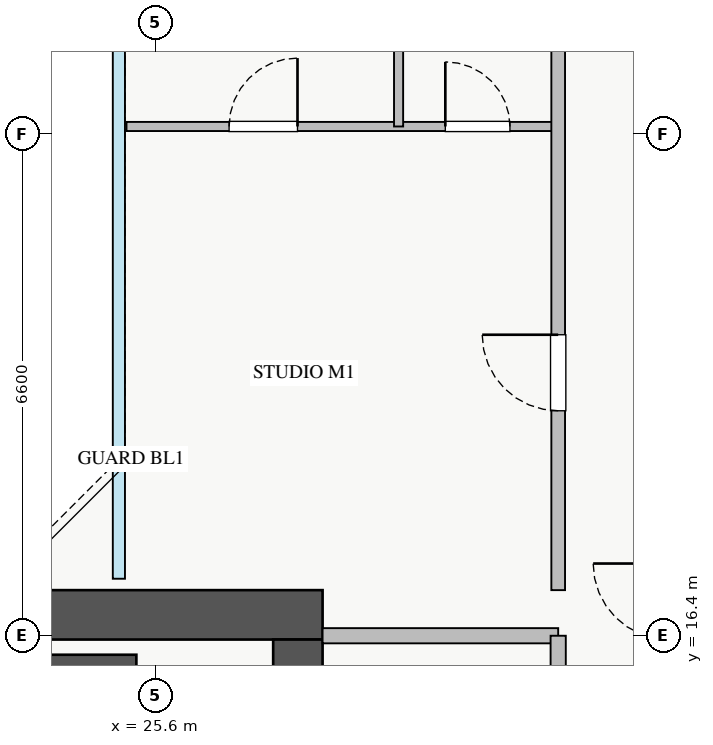
"""IFC4 building model, lengths in metres.
Left out: names, types, materials, properties, quantities, classifications, styles, units other than length and angle.
Written with IfcOpenShell. Run it as: python <this file> out.ifc"""

import sys

from ifc_helpers import new_model, si_unit, direction, frame, frame_2d, origin, place, context, subcontext, project, spatial, rectangle, extrude, source, transform, mapped, element, fill, save


model = new_model("IFC4")
c1 = context("Model", 3, precision=1e-05, world=origin(), true_north=direction((0.0, 1.0)))
c2 = subcontext(c1, "Body", "Model", "MODEL_VIEW")
j1 = project(units=[si_unit("LENGTHUNIT", "METRE"), si_unit("PLANEANGLEUNIT", "RADIAN")], contexts=[c1])
p1 = place(None, origin())
s1 = spatial("IfcSite", under=j1, at=p1, CompositionType="ELEMENT")
p2 = place(p1, origin())
s2 = spatial("IfcBuilding", under=s1, at=p2, CompositionType="ELEMENT")
p3 = place(p2, frame((0.0, 0.0, 150.25)))
s3 = spatial("IfcBuildingStorey", under=s2, at=p3, CompositionType="ELEMENT", Elevation=150.25)
p4 = place(p3, frame((18.2, 16.05, 0.0), z_axis=(0.0, 0.0, 1.0), x_axis=(1.0, 0.0, 0.0)))
e1 = element("IfcWall", 1, at=p4, inside=s3, PredefinedType="SHEAR", context=c2, shape_type="SweptSolid", body=[
    extrude(rectangle(XDim=7.15, YDim=0.2, at=frame_2d((3.575, 0.0))), origin(), (0.0, 0.0, 1.0), 3.25),
])
p5 = place(p3, frame((10.2, 16.675, 0.0), z_axis=(0.0, 0.0, 1.0), x_axis=(1.0, 0.0, 0.0)))
e2 = element("IfcWall", 2, at=p5, inside=s3, PredefinedType="SHEAR", context=c2, shape_type="SweptSolid", body=[
    extrude(rectangle(XDim=17.6, YDim=0.65, at=frame_2d((8.8, 0.0))), origin(), (0.0, 0.0, 1.0), 3.25),
])
p6 = place(p3, frame((27.475, 10.45, 0.0), z_axis=(0.0, 0.0, 1.0), x_axis=(0.0, 1.0, 0.0)))
e3 = element("IfcWall", 3, at=p6, inside=s3, PredefinedType="SHEAR", context=c2, shape_type="SweptSolid", body=[
    extrude(rectangle(XDim=5.9, YDim=0.65, at=frame_2d((2.95, 0.0))), origin(), (0.0, 0.0, 1.0), 3.25),
])
p7 = place(p6, frame((2.1, 0.0, 0.0)))
e4 = element("IfcOpeningElement", 4, at=p7, cuts=e3, PredefinedType="OPENING", context=c2, shape_type="SweptSolid", body=[
    extrude(rectangle(XDim=1.3, YDim=2.05, at=frame_2d((0.65, 1.025))), frame((0.0, 0.335, 0.0), z_axis=(0.0, -1.0, 0.0), x_axis=(1.0, 0.0, 0.0)), (0.0, 0.0, 1.0), 0.67),
])
p8 = place(p3, frame((27.8, 16.4, 0.0), z_axis=(0.0, 0.0, 1.0), x_axis=(1.0, 0.0, 0.0)))
e5 = element("IfcWall", 5, at=p8, inside=s3, PredefinedType="PARTITIONING", context=c2, shape_type="SweptSolid", body=[
    extrude(rectangle(XDim=3.1, YDim=0.2, at=frame_2d((1.55, 0.0))), origin(), (0.0, 0.0, 1.0), 3.07),
])
p9 = place(p3, frame((30.9, 12.5, 0.0), z_axis=(0.0, 0.0, 1.0), x_axis=(0.0, 1.0, 0.0)))
e6 = element("IfcWall", 6, at=p9, inside=s3, PredefinedType="PARTITIONING", context=c2, shape_type="SweptSolid", body=[
    extrude(rectangle(XDim=3.9, YDim=0.2, at=frame_2d((1.95, 0.0))), origin(), (0.0, 0.0, 1.0), 3.07),
])
p10 = place(p9, frame((1.4, 0.0, 0.0)))
e7 = element("IfcOpeningElement", 7, at=p10, cuts=e6, PredefinedType="OPENING", context=c2, shape_type="SweptSolid", body=[
    extrude(rectangle(XDim=1.1, YDim=2.05, at=frame_2d((0.55, 1.025))), frame((0.0, 0.11, 0.0), z_axis=(0.0, -1.0, 0.0), x_axis=(1.0, 0.0, 0.0)), (0.0, 0.0, 1.0), 0.22),
])
p11 = place(p3, frame((25.22, 23.1, 0.0), z_axis=(0.0, 0.0, 1.0), x_axis=(1.0, 0.0, 0.0)))
e8 = element("IfcWall", 8, at=p11, inside=s3, PredefinedType="PLUMBINGWALL", context=c2, shape_type="SweptSolid", body=[
    extrude(rectangle(XDim=5.68, YDim=0.12, at=frame_2d((2.84, 0.0))), origin(), (0.0, 0.0, 1.0), 3.07),
])
p12 = place(p11, frame((1.35, 0.0, 0.0)))
e9 = element("IfcOpeningElement", 9, at=p12, cuts=e8, PredefinedType="OPENING", context=c2, shape_type="SweptSolid", body=[
    extrude(rectangle(XDim=0.9, YDim=2.05, at=frame_2d((0.45, 1.025))), frame((0.0, 0.07, 0.0), z_axis=(0.0, -1.0, 0.0), x_axis=(1.0, 0.0, 0.0)), (0.0, 0.0, 1.0), 0.14),
])
p13 = place(p11, frame((4.195, 0.0, 0.0)))
e10 = element("IfcOpeningElement", 10, at=p13, cuts=e8, PredefinedType="OPENING", context=c2, shape_type="SweptSolid", body=[
    extrude(rectangle(XDim=0.85, YDim=2.05, at=frame_2d((0.425, 1.025))), frame((0.0, 0.07, 0.0), z_axis=(0.0, -1.0, 0.0), x_axis=(1.0, 0.0, 0.0)), (0.0, 0.0, 1.0), 0.14),
])
p14 = place(p3, frame((28.8, 23.1, 0.0), z_axis=(0.0, 0.0, 1.0), x_axis=(0.0, 1.0, 0.0)))
e11 = element("IfcWall", 11, at=p14, inside=s3, PredefinedType="PLUMBINGWALL", context=c2, shape_type="SweptSolid", body=[
    extrude(rectangle(XDim=5.9, YDim=0.12, at=frame_2d((2.95, 0.0))), origin(), (0.0, 0.0, 1.0), 3.07),
])
p15 = place(p3, frame((30.9, 17.0, 0.0), z_axis=(0.0, 0.0, 1.0), x_axis=(0.0, 1.0, 0.0)))
e12 = element("IfcWall", 12, at=p15, inside=s3, PredefinedType="PARTITIONING", context=c2, shape_type="SweptSolid", body=[
    extrude(rectangle(XDim=12.0, YDim=0.18, at=frame_2d((6.0, 0.0))), origin(), (0.0, 0.0, 1.0), 3.07),
])
p16 = place(p15, frame((2.36, 0.0, 0.0)))
e13 = element("IfcOpeningElement", 13, at=p16, cuts=e12, PredefinedType="OPENING", context=c2, shape_type="SweptSolid", body=[
    extrude(rectangle(XDim=1.0, YDim=2.05, at=frame_2d((0.5, 1.025))), frame((0.0, 0.1, 0.0), z_axis=(0.0, -1.0, 0.0), x_axis=(1.0, 0.0, 0.0)), (0.0, 0.0, 1.0), 0.2),
])
m1 = source(origin(), c2, "Body", "SweptSolid", [
    extrude(rectangle(XDim=0.9, YDim=2.05, at=frame_2d((0.45, 1.025))), frame((0.0, 0.025, 0.0), z_axis=(0.0, -1.0, 0.0), x_axis=(1.0, 0.0, 0.0)), (0.0, 0.0, 1.0), 0.05),
])
p17 = place(p12, origin())
e14 = element("IfcDoor", 14, at=p17, inside=s3, OperationType="SINGLE_SWING_RIGHT", PredefinedType="DOOR", context=c2, shape_type="MappedRepresentation", body=[
    mapped(m1, transform((0.0, 0.0, 0.0), x_axis=(1.0, 0.0, 0.0), y_axis=(0.0, 1.0, 0.0), z_axis=(0.0, 0.0, 1.0), scale=1.0)),
])
fill(e9, e14)
m2 = source(origin(), c2, "Body", "SweptSolid", [
    extrude(rectangle(XDim=0.85, YDim=2.05, at=frame_2d((0.425, 1.025))), frame((0.0, 0.025, 0.0), z_axis=(0.0, -1.0, 0.0), x_axis=(1.0, 0.0, 0.0)), (0.0, 0.0, 1.0), 0.05),
])
p18 = place(p13, origin())
e15 = element("IfcDoor", 15, at=p18, inside=s3, OperationType="SINGLE_SWING_LEFT", PredefinedType="DOOR", context=c2, shape_type="MappedRepresentation", body=[
    mapped(m2, transform((0.0, 0.0, 0.0), x_axis=(1.0, 0.0, 0.0), y_axis=(0.0, 1.0, 0.0), z_axis=(0.0, 0.0, 1.0), scale=1.0)),
])
fill(e10, e15)
m3 = source(origin(), c2, "Body", "SweptSolid", [
    extrude(rectangle(XDim=1.0, YDim=2.05, at=frame_2d((0.5, 1.025))), frame((0.0, 0.025, 0.0), z_axis=(0.0, -1.0, 0.0), x_axis=(1.0, 0.0, 0.0)), (0.0, 0.0, 1.0), 0.05),
])
p19 = place(p16, origin())
e16 = element("IfcDoor", 16, at=p19, inside=s3, OperationType="SINGLE_SWING_RIGHT", PredefinedType="DOOR", context=c2, shape_type="MappedRepresentation", body=[
    mapped(m3, transform((0.0, 0.0, 0.0), x_axis=(1.0, 0.0, 0.0), y_axis=(0.0, 1.0, 0.0), z_axis=(0.0, 0.0, 1.0), scale=1.0)),
])
fill(e13, e16)
save(model, sys.argv[1])
